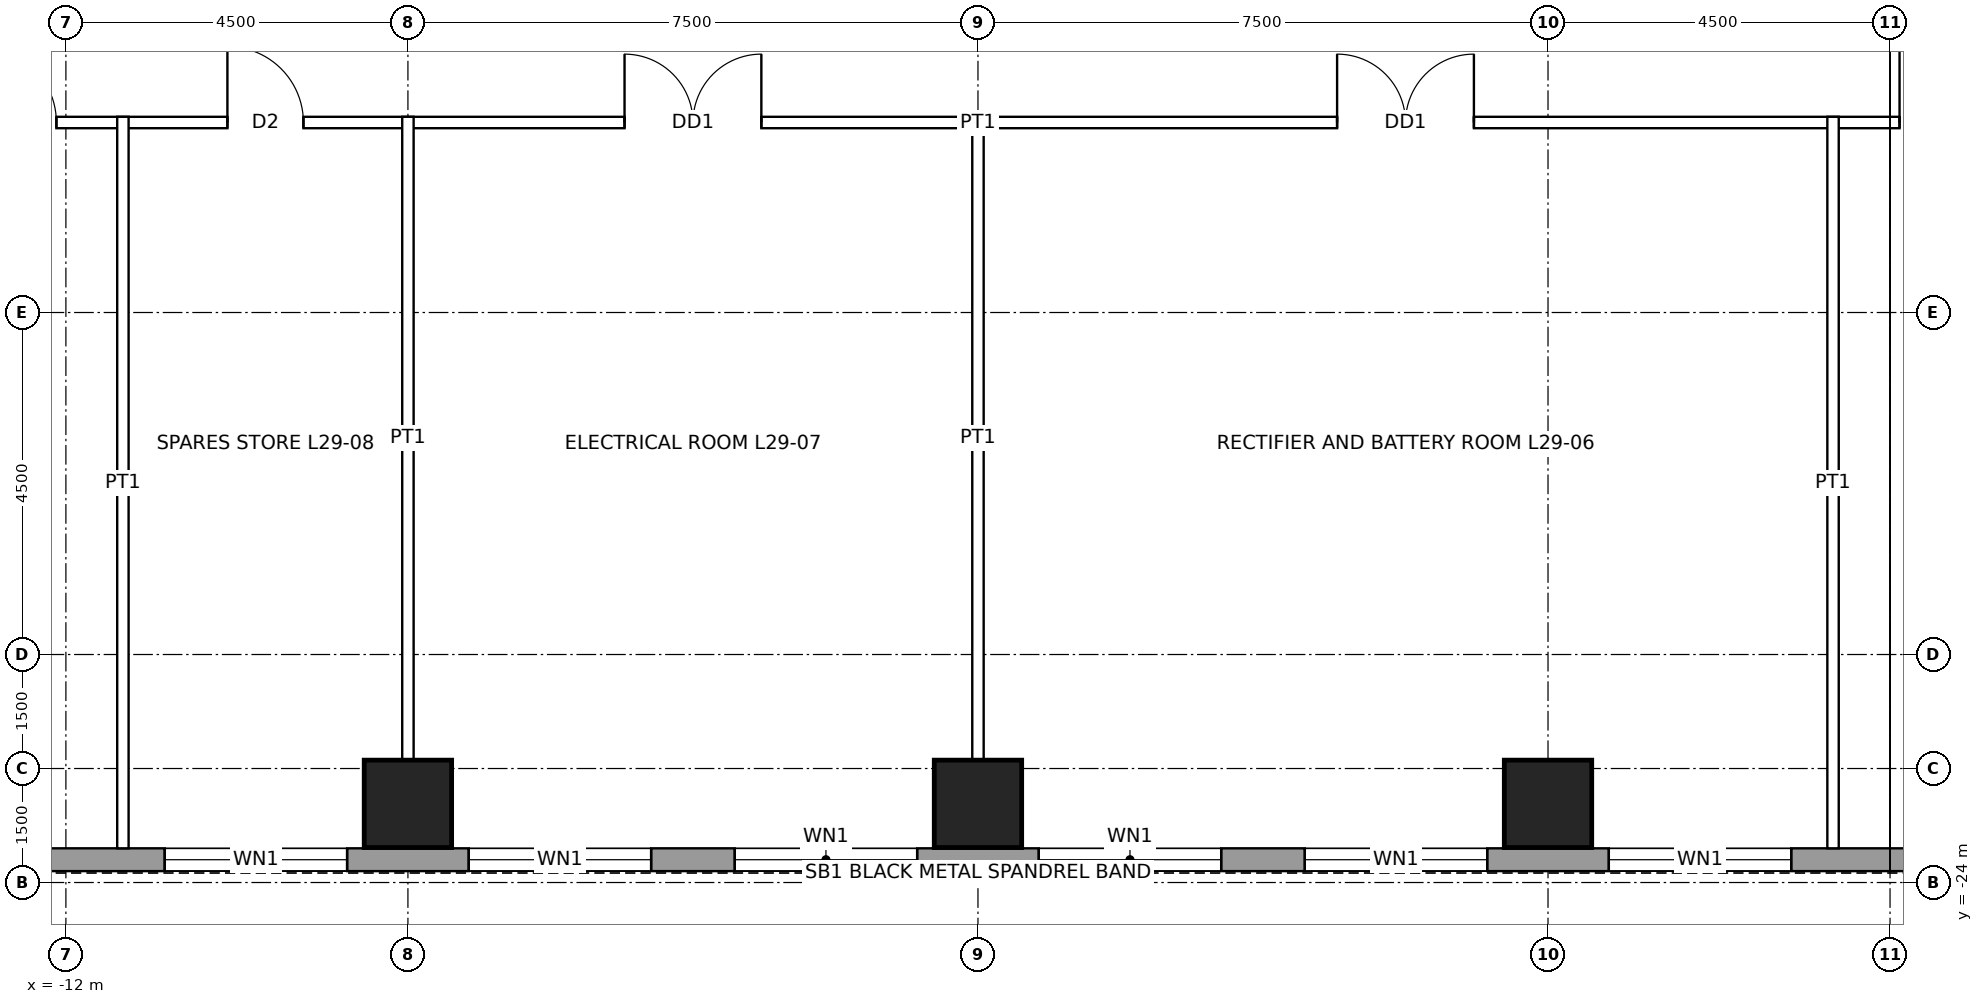
"""IFC4 building model, lengths in metres.
Left out: names, types, materials, properties, quantities, classifications, styles, units other than length and angle.
Written with IfcOpenShell. Run it as: python <this file> out.ifc"""

import sys

from ifc_helpers import new_model, si_unit, direction, frame, frame_2d, origin, origin_2d, place, context, subcontext, project, spatial, rectangle, hollow_rectangle, extrude, element, fill, save


model = new_model("IFC4")
c1 = context("Model", 3, precision=1e-05, world=origin(), true_north=direction((0.0, 1.0)))
c2 = subcontext(c1, "Body", "Model", "MODEL_VIEW")
j1 = project(units=[si_unit("LENGTHUNIT", "METRE"), si_unit("PLANEANGLEUNIT", "RADIAN")], contexts=[c1])
p1 = place(None, origin())
s1 = spatial("IfcSite", under=j1, at=p1, CompositionType="ELEMENT")
p2 = place(p1, origin())
s2 = spatial("IfcBuilding", under=s1, at=p2, CompositionType="ELEMENT")
p3 = place(p2, frame((0.0, 0.0, 144.9)))
s3 = spatial("IfcBuildingStorey", under=s2, at=p3, CompositionType="ELEMENT", Elevation=144.9)
for number, where, z_axis, x_axis in (
    (1, (7.5, -22.965, 0.0), (0.0, 0.0, 1.0), (1.0, 0.0, 0.0)),
    (2, (0.0, -22.965, 0.0), (0.0, 0.0, 1.0), (1.0, 0.0, 0.0)),
    (3, (-7.5, -22.965, 0.0), (0.0, 0.0, 1.0), (1.0, 0.0, 0.0)),
):
    element("IfcColumn", number, at=place(p3, frame(where, z_axis=z_axis, x_axis=x_axis)), inside=s3, PredefinedType="COLUMN", context=c2, shape_type="SweptSolid", body=[
        extrude(hollow_rectangle(XDim=1.15, YDim=1.15, WallThickness=0.075, at=origin_2d()), origin(), (0.0, 0.0, 1.0), 4.5),
    ])
p4 = place(p3, frame((16.2, -23.7, 0.0), z_axis=(0.0, 0.0, 1.0), x_axis=(-1.0, 0.0, 0.0)))
e4 = element("IfcWall", 4, at=p4, inside=s3, PredefinedType="SOLIDWALL", context=c2, shape_type="SweptSolid", body=[
    extrude(rectangle(XDim=32.4, YDim=0.3, at=frame_2d((16.2, 0.0))), origin(), (0.0, 0.0, 1.0), 4.3),
])
p5 = place(p4, frame((0.95, 0.0, 1.0)))
e5 = element("IfcOpeningElement", 5, at=p5, cuts=e4, PredefinedType="OPENING", context=c2, shape_type="SweptSolid", body=[
    extrude(rectangle(XDim=1.8, YDim=1.2, at=frame_2d((0.9, 0.6))), frame((0.0, 0.16, 0.0), z_axis=(0.0, -1.0, 0.0), x_axis=(1.0, 0.0, 0.0)), (0.0, 0.0, 1.0), 0.32),
])
p6 = place(p4, frame((5.5, 0.0, 1.0)))
e6 = element("IfcOpeningElement", 6, at=p6, cuts=e4, PredefinedType="OPENING", context=c2, shape_type="SweptSolid", body=[
    extrude(rectangle(XDim=2.4, YDim=1.2, at=frame_2d((1.2, 0.6))), frame((0.0, 0.16, 0.0), z_axis=(0.0, -1.0, 0.0), x_axis=(1.0, 0.0, 0.0)), (0.0, 0.0, 1.0), 0.32),
])
p7 = place(p4, frame((9.5, 0.0, 1.0)))
e7 = element("IfcOpeningElement", 7, at=p7, cuts=e4, PredefinedType="OPENING", context=c2, shape_type="SweptSolid", body=[
    extrude(rectangle(XDim=2.4, YDim=1.2, at=frame_2d((1.2, 0.6))), frame((0.0, 0.16, 0.0), z_axis=(0.0, -1.0, 0.0), x_axis=(1.0, 0.0, 0.0)), (0.0, 0.0, 1.0), 0.32),
])
p8 = place(p4, frame((13.0, 0.0, 1.0)))
e8 = element("IfcOpeningElement", 8, at=p8, cuts=e4, PredefinedType="OPENING", context=c2, shape_type="SweptSolid", body=[
    extrude(rectangle(XDim=2.4, YDim=1.2, at=frame_2d((1.2, 0.6))), frame((0.0, 0.16, 0.0), z_axis=(0.0, -1.0, 0.0), x_axis=(1.0, 0.0, 0.0)), (0.0, 0.0, 1.0), 0.32),
])
p9 = place(p4, frame((17.0, 0.0, 1.0)))
e9 = element("IfcOpeningElement", 9, at=p9, cuts=e4, PredefinedType="OPENING", context=c2, shape_type="SweptSolid", body=[
    extrude(rectangle(XDim=2.4, YDim=1.2, at=frame_2d((1.2, 0.6))), frame((0.0, 0.16, 0.0), z_axis=(0.0, -1.0, 0.0), x_axis=(1.0, 0.0, 0.0)), (0.0, 0.0, 1.0), 0.32),
])
p10 = place(p4, frame((20.5, 0.0, 1.0)))
e10 = element("IfcOpeningElement", 10, at=p10, cuts=e4, PredefinedType="OPENING", context=c2, shape_type="SweptSolid", body=[
    extrude(rectangle(XDim=2.4, YDim=1.2, at=frame_2d((1.2, 0.6))), frame((0.0, 0.16, 0.0), z_axis=(0.0, -1.0, 0.0), x_axis=(1.0, 0.0, 0.0)), (0.0, 0.0, 1.0), 0.32),
])
p11 = place(p4, frame((24.5, 0.0, 1.0)))
e11 = element("IfcOpeningElement", 11, at=p11, cuts=e4, PredefinedType="OPENING", context=c2, shape_type="SweptSolid", body=[
    extrude(rectangle(XDim=2.4, YDim=1.2, at=frame_2d((1.2, 0.6))), frame((0.0, 0.16, 0.0), z_axis=(0.0, -1.0, 0.0), x_axis=(1.0, 0.0, 0.0)), (0.0, 0.0, 1.0), 0.32),
])
p12 = place(p4, frame((29.65, 0.0, 1.0)))
e12 = element("IfcOpeningElement", 12, at=p12, cuts=e4, PredefinedType="OPENING", context=c2, shape_type="SweptSolid", body=[
    extrude(rectangle(XDim=1.8, YDim=1.2, at=frame_2d((0.9, 0.6))), frame((0.0, 0.16, 0.0), z_axis=(0.0, -1.0, 0.0), x_axis=(1.0, 0.0, 0.0)), (0.0, 0.0, 1.0), 0.32),
])
p13 = place(p3, frame((-14.075, -14.0, 0.0), z_axis=(0.0, 0.0, 1.0), x_axis=(1.0, 0.0, 0.0)))
e13 = element("IfcWall", 13, at=p13, inside=s3, PredefinedType="PARTITIONING", context=c2, shape_type="SweptSolid", body=[
    extrude(rectangle(XDim=28.15, YDim=0.15, at=frame_2d((14.075, 0.0))), origin(), (0.0, 0.0, 1.0), 4.3),
])
p14 = place(p13, frame((18.8, 0.0, 0.0)))
e14 = element("IfcOpeningElement", 14, at=p14, cuts=e13, PredefinedType="OPENING", context=c2, shape_type="SweptSolid", body=[
    extrude(rectangle(XDim=1.8, YDim=2.4, at=frame_2d((0.9, 1.2))), frame((0.0, 0.085, 0.0), z_axis=(0.0, -1.0, 0.0), x_axis=(1.0, 0.0, 0.0)), (0.0, 0.0, 1.0), 0.17),
])
p15 = place(p13, frame((9.425, 0.0, 0.0)))
e15 = element("IfcOpeningElement", 15, at=p15, cuts=e13, PredefinedType="OPENING", context=c2, shape_type="SweptSolid", body=[
    extrude(rectangle(XDim=1.8, YDim=2.4, at=frame_2d((0.9, 1.2))), frame((0.0, 0.085, 0.0), z_axis=(0.0, -1.0, 0.0), x_axis=(1.0, 0.0, 0.0)), (0.0, 0.0, 1.0), 0.17),
])
p16 = place(p13, frame((4.2, 0.0, 0.0)))
e16 = element("IfcOpeningElement", 16, at=p16, cuts=e13, PredefinedType="OPENING", context=c2, shape_type="SweptSolid", body=[
    extrude(rectangle(XDim=1.0, YDim=2.1, at=frame_2d((0.5, 1.05))), frame((0.0, 0.085, 0.0), z_axis=(0.0, -1.0, 0.0), x_axis=(1.0, 0.0, 0.0)), (0.0, 0.0, 1.0), 0.17),
])
p17 = place(p13, frame((26.2, 0.0, 0.0)))
e17 = element("IfcOpeningElement", 17, at=p17, cuts=e13, PredefinedType="OPENING", context=c2, shape_type="SweptSolid", body=[
    extrude(rectangle(XDim=1.0, YDim=2.1, at=frame_2d((0.5, 1.05))), frame((0.0, 0.085, 0.0), z_axis=(0.0, -1.0, 0.0), x_axis=(1.0, 0.0, 0.0)), (0.0, 0.0, 1.0), 0.17),
])
p18 = place(p13, frame((0.95, 0.0, 0.0)))
e18 = element("IfcOpeningElement", 18, at=p18, cuts=e13, PredefinedType="OPENING", context=c2, shape_type="SweptSolid", body=[
    extrude(rectangle(XDim=1.0, YDim=2.1, at=frame_2d((0.5, 1.05))), frame((0.0, 0.085, 0.0), z_axis=(0.0, -1.0, 0.0), x_axis=(1.0, 0.0, 0.0)), (0.0, 0.0, 1.0), 0.17),
])
p19 = place(p3, frame((-11.25, -23.55, 0.0), z_axis=(0.0, 0.0, 1.0), x_axis=(0.0, 1.0, 0.0)))
e19 = element("IfcWall", 19, at=p19, inside=s3, PredefinedType="PARTITIONING", context=c2, shape_type="SweptSolid", body=[
    extrude(rectangle(XDim=9.625, YDim=0.15, at=frame_2d((4.812, 0.0))), origin(), (0.0, 0.0, 1.0), 3.431),
])
for number, where, z_axis, x_axis in (
    (20, (-7.5, -22.39, 0.0), (0.0, 0.0, 1.0), (0.0, 1.0, 0.0)),
    (21, (0.0, -22.39, 0.0), (0.0, 0.0, 1.0), (0.0, 1.0, 0.0)),
):
    element("IfcWall", number, at=place(p3, frame(where, z_axis=z_axis, x_axis=x_axis)), inside=s3, PredefinedType="PARTITIONING", context=c2, shape_type="SweptSolid", body=[
        extrude(rectangle(XDim=8.465, YDim=0.15, at=frame_2d((4.232, 0.0))), origin(), (0.0, 0.0, 1.0), 3.431),
    ])
p20 = place(p3, frame((11.25, -23.55, 0.0), z_axis=(0.0, 0.0, 1.0), x_axis=(0.0, 1.0, 0.0)))
e22 = element("IfcWall", 22, at=p20, inside=s3, PredefinedType="PARTITIONING", context=c2, shape_type="SweptSolid", body=[
    extrude(rectangle(XDim=9.625, YDim=0.15, at=frame_2d((4.812, 0.0))), origin(), (0.0, 0.0, 1.0), 3.431),
])
p21 = place(p6, origin())
e23 = element("IfcWindow", 23, at=p21, inside=s3, PartitioningType="SINGLE_PANEL", PredefinedType="WINDOW", context=c2, shape_type="SweptSolid", body=[
    extrude(rectangle(XDim=2.4, YDim=1.2, at=frame_2d((1.2, 0.6))), frame((0.0, 0.03, 0.0), z_axis=(0.0, -1.0, 0.0), x_axis=(1.0, 0.0, 0.0)), (0.0, 0.0, 1.0), 0.06),
])
fill(e6, e23)
p22 = place(p7, origin())
e24 = element("IfcWindow", 24, at=p22, inside=s3, PartitioningType="SINGLE_PANEL", PredefinedType="WINDOW", context=c2, shape_type="SweptSolid", body=[
    extrude(rectangle(XDim=2.4, YDim=1.2, at=frame_2d((1.2, 0.6))), frame((0.0, 0.03, 0.0), z_axis=(0.0, -1.0, 0.0), x_axis=(1.0, 0.0, 0.0)), (0.0, 0.0, 1.0), 0.06),
])
fill(e7, e24)
p23 = place(p8, origin())
e25 = element("IfcWindow", 25, at=p23, inside=s3, PartitioningType="SINGLE_PANEL", PredefinedType="WINDOW", context=c2, shape_type="SweptSolid", body=[
    extrude(rectangle(XDim=2.4, YDim=1.2, at=frame_2d((1.2, 0.6))), frame((0.0, 0.03, 0.0), z_axis=(0.0, -1.0, 0.0), x_axis=(1.0, 0.0, 0.0)), (0.0, 0.0, 1.0), 0.06),
])
fill(e8, e25)
p24 = place(p9, origin())
e26 = element("IfcWindow", 26, at=p24, inside=s3, PartitioningType="SINGLE_PANEL", PredefinedType="WINDOW", context=c2, shape_type="SweptSolid", body=[
    extrude(rectangle(XDim=2.4, YDim=1.2, at=frame_2d((1.2, 0.6))), frame((0.0, 0.03, 0.0), z_axis=(0.0, -1.0, 0.0), x_axis=(1.0, 0.0, 0.0)), (0.0, 0.0, 1.0), 0.06),
])
fill(e9, e26)
p25 = place(p10, origin())
e27 = element("IfcWindow", 27, at=p25, inside=s3, PartitioningType="SINGLE_PANEL", PredefinedType="WINDOW", context=c2, shape_type="SweptSolid", body=[
    extrude(rectangle(XDim=2.4, YDim=1.2, at=frame_2d((1.2, 0.6))), frame((0.0, 0.03, 0.0), z_axis=(0.0, -1.0, 0.0), x_axis=(1.0, 0.0, 0.0)), (0.0, 0.0, 1.0), 0.06),
])
fill(e10, e27)
p26 = place(p11, origin())
e28 = element("IfcWindow", 28, at=p26, inside=s3, PartitioningType="SINGLE_PANEL", PredefinedType="WINDOW", context=c2, shape_type="SweptSolid", body=[
    extrude(rectangle(XDim=2.4, YDim=1.2, at=frame_2d((1.2, 0.6))), frame((0.0, 0.03, 0.0), z_axis=(0.0, -1.0, 0.0), x_axis=(1.0, 0.0, 0.0)), (0.0, 0.0, 1.0), 0.06),
])
fill(e11, e28)
p27 = place(p14, origin())
e29 = element("IfcDoor", 29, at=p27, inside=s3, OperationType="DOUBLE_DOOR_SINGLE_SWING", PredefinedType="DOOR", context=c2, shape_type="SweptSolid", body=[
    extrude(rectangle(XDim=1.8, YDim=2.4, at=frame_2d((0.9, 1.2))), frame((0.0, 0.025, 0.0), z_axis=(0.0, -1.0, 0.0), x_axis=(1.0, 0.0, 0.0)), (0.0, 0.0, 1.0), 0.05),
])
fill(e14, e29)
p28 = place(p15, origin())
e30 = element("IfcDoor", 30, at=p28, inside=s3, OperationType="DOUBLE_DOOR_SINGLE_SWING", PredefinedType="DOOR", context=c2, shape_type="SweptSolid", body=[
    extrude(rectangle(XDim=1.8, YDim=2.4, at=frame_2d((0.9, 1.2))), frame((0.0, 0.025, 0.0), z_axis=(0.0, -1.0, 0.0), x_axis=(1.0, 0.0, 0.0)), (0.0, 0.0, 1.0), 0.05),
])
fill(e15, e30)
p29 = place(p16, origin())
e31 = element("IfcDoor", 31, at=p29, inside=s3, OperationType="SINGLE_SWING_LEFT", PredefinedType="DOOR", context=c2, shape_type="SweptSolid", body=[
    extrude(rectangle(XDim=1.0, YDim=2.1, at=frame_2d((0.5, 1.05))), frame((0.0, 0.025, 0.0), z_axis=(0.0, -1.0, 0.0), x_axis=(1.0, 0.0, 0.0)), (0.0, 0.0, 1.0), 0.05),
])
fill(e16, e31)
p30 = place(p17, origin())
e32 = element("IfcDoor", 32, at=p30, inside=s3, OperationType="SINGLE_SWING_LEFT", PredefinedType="DOOR", context=c2, shape_type="SweptSolid", body=[
    extrude(rectangle(XDim=1.0, YDim=2.1, at=frame_2d((0.5, 1.05))), frame((0.0, 0.025, 0.0), z_axis=(0.0, -1.0, 0.0), x_axis=(1.0, 0.0, 0.0)), (0.0, 0.0, 1.0), 0.05),
])
fill(e17, e32)
p31 = place(p18, origin())
e33 = element("IfcDoor", 33, at=p31, inside=s3, OperationType="SINGLE_SWING_LEFT", PredefinedType="DOOR", context=c2, shape_type="SweptSolid", body=[
    extrude(rectangle(XDim=1.0, YDim=2.1, at=frame_2d((0.5, 1.05))), frame((0.0, 0.025, 0.0), z_axis=(0.0, -1.0, 0.0), x_axis=(1.0, 0.0, 0.0)), (0.0, 0.0, 1.0), 0.05),
])
fill(e18, e33)
save(model, sys.argv[1])
